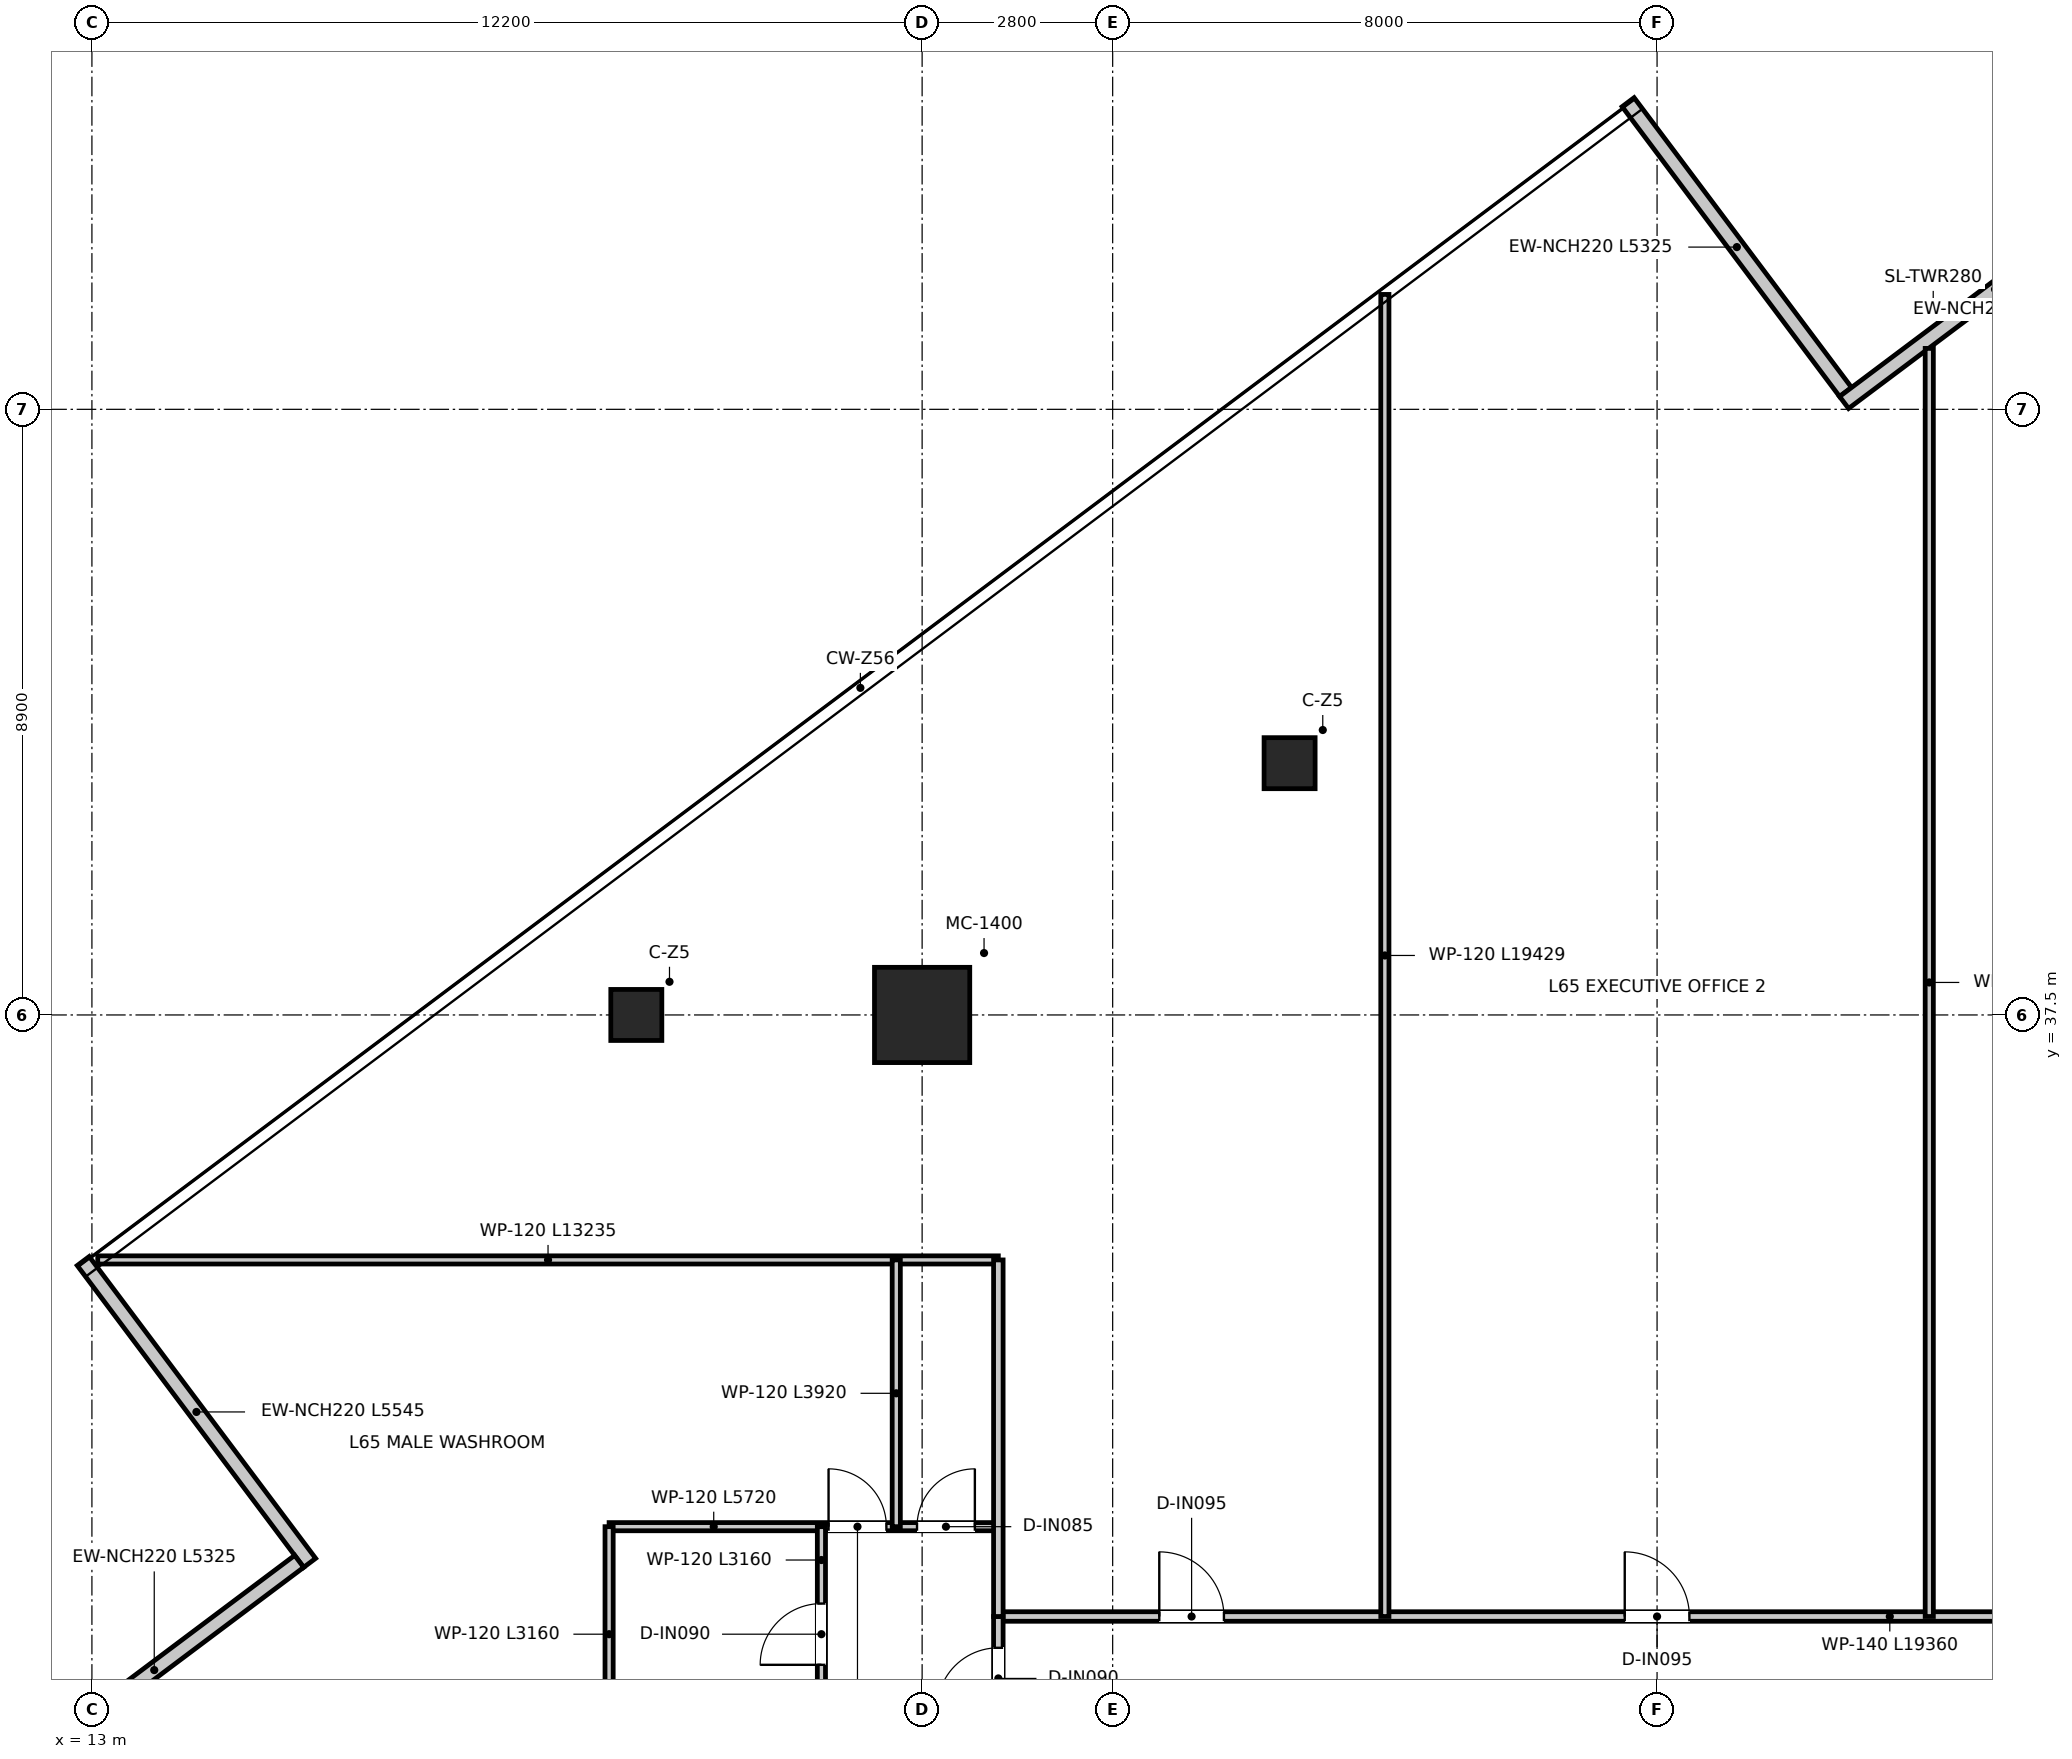
"""IFC4 building model, lengths in metres.
Left out: names, types, materials, properties, quantities, classifications, styles, units other than length and angle.
Written with IfcOpenShell. Run it as: python <this file> out.ifc"""

import sys

from ifc_helpers import new_model, si_unit, direction, frame, frame_2d, origin, origin_2d, place, context, subcontext, project, spatial, rectangle, extrude, source, transform, mapped, element, fill, save


model = new_model("IFC4")
c1 = context("Model", 3, precision=1e-05, world=origin(), true_north=direction((0.0, 1.0)))
c2 = subcontext(c1, "Body", "Model", "MODEL_VIEW")
j1 = project(units=[si_unit("LENGTHUNIT", "METRE"), si_unit("PLANEANGLEUNIT", "RADIAN")], contexts=[c1])
p1 = place(None, origin())
s1 = spatial("IfcSite", under=j1, at=p1, CompositionType="ELEMENT")
p2 = place(p1, origin())
s2 = spatial("IfcBuilding", under=s1, at=p2, CompositionType="ELEMENT")
p3 = place(p2, frame((0.0, 0.0, 267.4)))
s3 = spatial("IfcBuildingStorey", under=s2, at=p3, CompositionType="ELEMENT", Elevation=267.4)
m1 = source(origin(), c2, "Body", "SweptSolid", [
    extrude(rectangle(XDim=1.4, YDim=1.4, at=origin_2d()), origin(), (0.0, 0.0, 1.0), 3.95),
])
p4 = place(p3, frame((25.2, 37.5, 0.0), z_axis=(0.0, 0.0, 1.0), x_axis=(1.0, 0.0, 0.0)))
e1 = element("IfcColumn", 1, at=p4, inside=s3, PredefinedType="USERDEFINED", context=c2, shape_type="MappedRepresentation", body=[
    mapped(m1, transform((0.0, 0.0, 0.0), x_axis=(1.0, 0.0, 0.0), y_axis=(0.0, 1.0, 0.0), z_axis=(0.0, 0.0, 1.0), scale=1.0)),
])
m2 = source(origin(), c2, "Body", "SweptSolid", [
    extrude(rectangle(XDim=0.75, YDim=0.75, at=origin_2d()), origin(), (0.0, 0.0, 1.0), 3.95),
])
for number, where, z_axis, x_axis in (
    (2, (21.0, 37.5, 0.0), (0.0, 0.0, 1.0), (1.0, 0.0, 0.0)),
    (3, (30.6, 41.2, 0.0), (0.0, 0.0, 1.0), (1.0, 0.0, 0.0)),
):
    element("IfcColumn", number, at=place(p3, frame(where, z_axis=z_axis, x_axis=x_axis)), inside=s3, PredefinedType="COLUMN", context=c2, shape_type="MappedRepresentation", body=[
        mapped(m2, transform((0.0, 0.0, 0.0), x_axis=(1.0, 0.0, 0.0), y_axis=(0.0, 1.0, 0.0), z_axis=(0.0, 0.0, 1.0), scale=1.0)),
    ])
p5 = place(p3, frame((38.77, 46.654, 0.0), z_axis=(0.0, 0.0, 1.0), x_axis=(-0.600058683831, 0.799955983763, 0.0)))
e4 = element("IfcWall", 4, at=p5, inside=s3, PredefinedType="ELEMENTEDWALL", context=c2, shape_type="SweptSolid", body=[
    extrude(rectangle(XDim=5.325, YDim=0.22, at=frame_2d((2.663, 0.0))), origin(), (0.0, 0.0, 1.0), 3.67),
])
p6 = place(p3, frame((12.872, 33.884, 0.0), z_axis=(0.0, 0.0, 1.0), x_axis=(0.600063399047, -0.799952446789, 0.0)))
e5 = element("IfcWall", 5, at=p6, inside=s3, PredefinedType="ELEMENTEDWALL", context=c2, shape_type="SweptSolid", body=[
    extrude(rectangle(XDim=5.545, YDim=0.22, at=frame_2d((2.772, 0.0))), origin(), (0.0, 0.0, 1.0), 3.67),
])
p7 = place(p3, frame((16.046, 29.47, 0.0), z_axis=(0.0, 0.0, 1.0), x_axis=(-0.799939474344, -0.600080692395, 0.0)))
e6 = element("IfcWall", 6, at=p7, inside=s3, PredefinedType="ELEMENTEDWALL", context=c2, shape_type="SweptSolid", body=[
    extrude(rectangle(XDim=5.325, YDim=0.22, at=frame_2d((2.662, 0.0))), origin(), (0.0, 0.0, 1.0), 3.67),
])
p8 = place(p3, frame((43.184, 49.828, 0.0), z_axis=(0.0, 0.0, 1.0), x_axis=(-0.799936592369, -0.600084534203, 0.0)))
e7 = element("IfcWall", 7, at=p8, inside=s3, PredefinedType="ELEMENTEDWALL", context=c2, shape_type="SweptSolid", body=[
    extrude(rectangle(XDim=5.545, YDim=0.22, at=frame_2d((2.772, 0.0))), origin(), (0.0, 0.0, 1.0), 3.67),
])
p9 = place(p3, frame((26.32, 28.66, 0.0), z_axis=(0.0, 0.0, 1.0), x_axis=(1.0, 0.0, 0.0)))
e8 = element("IfcWall", 8, at=p9, inside=s3, PredefinedType="PARTITIONING", context=c2, shape_type="SweptSolid", body=[
    extrude(rectangle(XDim=19.36, YDim=0.14, at=frame_2d((9.68, 0.0))), origin(), (0.0, 0.0, 1.0), 3.18),
])
p10 = place(p9, frame((2.365, 0.0, 0.0)))
e9 = element("IfcOpeningElement", 9, at=p10, cuts=e8, PredefinedType="OPENING", context=c2, shape_type="SweptSolid", body=[
    extrude(rectangle(XDim=0.95, YDim=2.1, at=frame_2d((0.475, 1.05))), frame((0.0, 0.08, 0.0), z_axis=(0.0, -1.0, 0.0), x_axis=(1.0, 0.0, 0.0)), (0.0, 0.0, 1.0), 0.16),
])
p11 = place(p9, frame((9.205, 0.0, 0.0)))
e10 = element("IfcOpeningElement", 10, at=p11, cuts=e8, PredefinedType="OPENING", context=c2, shape_type="SweptSolid", body=[
    extrude(rectangle(XDim=0.95, YDim=2.1, at=frame_2d((0.475, 1.05))), frame((0.0, 0.08, 0.0), z_axis=(0.0, -1.0, 0.0), x_axis=(1.0, 0.0, 0.0)), (0.0, 0.0, 1.0), 0.16),
])
p12 = place(p9, frame((16.045, 0.0, 0.0)))
e11 = element("IfcOpeningElement", 11, at=p12, cuts=e8, PredefinedType="OPENING", context=c2, shape_type="SweptSolid", body=[
    extrude(rectangle(XDim=0.95, YDim=2.1, at=frame_2d((0.475, 1.05))), frame((0.0, 0.08, 0.0), z_axis=(0.0, -1.0, 0.0), x_axis=(1.0, 0.0, 0.0)), (0.0, 0.0, 1.0), 0.16),
])
p13 = place(p3, frame((26.32, 9.0, 0.0), z_axis=(0.0, 0.0, 1.0), x_axis=(0.0, 1.0, 0.0)))
e12 = element("IfcWall", 12, at=p13, inside=s3, PredefinedType="PARTITIONING", context=c2, shape_type="SweptSolid", body=[
    extrude(rectangle(XDim=19.66, YDim=0.14, at=frame_2d((9.83, 0.0))), origin(), (0.0, 0.0, 1.0), 3.13),
])
p14 = place(p13, frame((18.3, 0.0, 0.0)))
e13 = element("IfcOpeningElement", 13, at=p14, cuts=e12, PredefinedType="OPENING", context=c2, shape_type="SweptSolid", body=[
    extrude(rectangle(XDim=0.9, YDim=2.1, at=frame_2d((0.45, 1.05))), frame((0.0, 0.08, 0.0), z_axis=(0.0, -1.0, 0.0), x_axis=(1.0, 0.0, 0.0)), (0.0, 0.0, 1.0), 0.16),
])
p15 = place(p13, frame((1.8, 0.0, 0.0)))
e14 = element("IfcOpeningElement", 14, at=p15, cuts=e12, PredefinedType="OPENING", context=c2, shape_type="SweptSolid", body=[
    extrude(rectangle(XDim=0.9, YDim=2.1, at=frame_2d((0.45, 1.05))), frame((0.0, 0.08, 0.0), z_axis=(0.0, -1.0, 0.0), x_axis=(1.0, 0.0, 0.0)), (0.0, 0.0, 1.0), 0.16),
])
p16 = place(p13, frame((9.55, 0.0, 0.0)))
e15 = element("IfcOpeningElement", 15, at=p16, cuts=e12, PredefinedType="OPENING", context=c2, shape_type="SweptSolid", body=[
    extrude(rectangle(XDim=0.9, YDim=2.1, at=frame_2d((0.45, 1.05))), frame((0.0, 0.08, 0.0), z_axis=(0.0, -1.0, 0.0), x_axis=(1.0, 0.0, 0.0)), (0.0, 0.0, 1.0), 0.16),
])
p17 = place(p13, frame((14.21, 0.0, 0.0)))
e16 = element("IfcOpeningElement", 16, at=p17, cuts=e12, PredefinedType="OPENING", context=c2, shape_type="SweptSolid", body=[
    extrude(rectangle(XDim=0.9, YDim=2.1, at=frame_2d((0.45, 1.05))), frame((0.0, 0.08, 0.0), z_axis=(0.0, -1.0, 0.0), x_axis=(1.0, 0.0, 0.0)), (0.0, 0.0, 1.0), 0.16),
])
p18 = place(p3, frame((13.085, 33.9, 0.0), z_axis=(0.0, 0.0, 1.0), x_axis=(1.0, 0.0, 0.0)))
e17 = element("IfcWall", 17, at=p18, inside=s3, PredefinedType="PARTITIONING", context=c2, shape_type="SweptSolid", body=[
    extrude(rectangle(XDim=13.235, YDim=0.12, at=frame_2d((6.617, 0.0))), origin(), (0.0, 0.0, 1.0), 3.13),
])
p19 = place(p3, frame((20.6, 29.98, 0.0), z_axis=(0.0, 0.0, 1.0), x_axis=(1.0, 0.0, 0.0)))
e18 = element("IfcWall", 18, at=p19, inside=s3, PredefinedType="PARTITIONING", context=c2, shape_type="SweptSolid", body=[
    extrude(rectangle(XDim=5.72, YDim=0.12, at=frame_2d((2.86, 0.0))), origin(), (0.0, 0.0, 1.0), 3.13),
])
p20 = place(p19, frame((3.225, 0.0, 0.0)))
e19 = element("IfcOpeningElement", 19, at=p20, cuts=e18, PredefinedType="OPENING", context=c2, shape_type="SweptSolid", body=[
    extrude(rectangle(XDim=0.85, YDim=2.1, at=frame_2d((0.425, 1.05))), frame((0.0, 0.07, 0.0), z_axis=(0.0, -1.0, 0.0), x_axis=(1.0, 0.0, 0.0)), (0.0, 0.0, 1.0), 0.14),
])
p21 = place(p19, frame((4.525, 0.0, 0.0)))
e20 = element("IfcOpeningElement", 20, at=p21, cuts=e18, PredefinedType="OPENING", context=c2, shape_type="SweptSolid", body=[
    extrude(rectangle(XDim=0.85, YDim=2.1, at=frame_2d((0.425, 1.05))), frame((0.0, 0.07, 0.0), z_axis=(0.0, -1.0, 0.0), x_axis=(1.0, 0.0, 0.0)), (0.0, 0.0, 1.0), 0.14),
])
p22 = place(p3, frame((20.6, 26.82, 0.0), z_axis=(0.0, 0.0, 1.0), x_axis=(0.0, 1.0, 0.0)))
e21 = element("IfcWall", 21, at=p22, inside=s3, PredefinedType="PARTITIONING", context=c2, shape_type="SweptSolid", body=[
    extrude(rectangle(XDim=3.16, YDim=0.12, at=frame_2d((1.58, 0.0))), origin(), (0.0, 0.0, 1.0), 3.67),
])
p23 = place(p3, frame((23.72, 26.82, 0.0), z_axis=(0.0, 0.0, 1.0), x_axis=(0.0, 1.0, 0.0)))
e22 = element("IfcWall", 22, at=p23, inside=s3, PredefinedType="PARTITIONING", context=c2, shape_type="SweptSolid", body=[
    extrude(rectangle(XDim=3.16, YDim=0.12, at=frame_2d((1.58, 0.0))), origin(), (0.0, 0.0, 1.0), 3.18),
])
p24 = place(p23, frame((1.13, 0.0, 0.0)))
e23 = element("IfcOpeningElement", 23, at=p24, cuts=e22, PredefinedType="OPENING", context=c2, shape_type="SweptSolid", body=[
    extrude(rectangle(XDim=0.9, YDim=2.1, at=frame_2d((0.45, 1.05))), frame((0.0, 0.07, 0.0), z_axis=(0.0, -1.0, 0.0), x_axis=(1.0, 0.0, 0.0)), (0.0, 0.0, 1.0), 0.14),
])
p25 = place(p3, frame((24.82, 29.98, 0.0), z_axis=(0.0, 0.0, 1.0), x_axis=(0.0, 1.0, 0.0)))
e24 = element("IfcWall", 24, at=p25, inside=s3, PredefinedType="PARTITIONING", context=c2, shape_type="SweptSolid", body=[
    extrude(rectangle(XDim=3.92, YDim=0.12, at=frame_2d((1.96, 0.0))), origin(), (0.0, 0.0, 1.0), 3.31),
])
p26 = place(p3, frame((26.32, 28.66, 0.0), z_axis=(0.0, 0.0, 1.0), x_axis=(0.0, 1.0, 0.0)))
e25 = element("IfcWall", 25, at=p26, inside=s3, PredefinedType="PARTITIONING", context=c2, shape_type="SweptSolid", body=[
    extrude(rectangle(XDim=5.24, YDim=0.14, at=frame_2d((2.62, 0.0))), origin(), (0.0, 0.0, 1.0), 3.43),
])
p27 = place(p3, frame((32.0, 28.66, 0.0), z_axis=(0.0, 0.0, 1.0), x_axis=(0.0, 1.0, 0.0)))
e26 = element("IfcWall", 26, at=p27, inside=s3, PredefinedType="PARTITIONING", context=c2, shape_type="SweptSolid", body=[
    extrude(rectangle(XDim=19.429, YDim=0.12, at=frame_2d((9.714, 0.0))), origin(), (0.0, 0.0, 1.0), 3.13),
])
p28 = place(p3, frame((40.0, 28.66, 0.0), z_axis=(0.0, 0.0, 1.0), x_axis=(0.0, 1.0, 0.0)))
e27 = element("IfcWall", 27, at=p28, inside=s3, PredefinedType="PARTITIONING", context=c2, shape_type="SweptSolid", body=[
    extrude(rectangle(XDim=18.635, YDim=0.12, at=frame_2d((9.318, 0.0))), origin(), (0.0, 0.0, 1.0), 3.13),
])
p29 = place(p14, origin())
e28 = element("IfcDoor", 28, at=p29, inside=s3, OperationType="SINGLE_SWING_LEFT", PredefinedType="DOOR", context=c2, shape_type="SweptSolid", body=[
    extrude(rectangle(XDim=0.9, YDim=2.1, at=frame_2d((0.45, 1.05))), frame((0.0, 0.025, 0.0), z_axis=(0.0, -1.0, 0.0), x_axis=(1.0, 0.0, 0.0)), (0.0, 0.0, 1.0), 0.05),
])
fill(e13, e28)
p30 = place(p20, origin())
e29 = element("IfcDoor", 29, at=p30, inside=s3, OperationType="SINGLE_SWING_LEFT", PredefinedType="DOOR", context=c2, shape_type="SweptSolid", body=[
    extrude(rectangle(XDim=0.85, YDim=2.1, at=frame_2d((0.425, 1.05))), frame((0.0, 0.025, 0.0), z_axis=(0.0, -1.0, 0.0), x_axis=(1.0, 0.0, 0.0)), (0.0, 0.0, 1.0), 0.05),
])
fill(e19, e29)
p31 = place(p21, origin())
e30 = element("IfcDoor", 30, at=p31, inside=s3, OperationType="SINGLE_SWING_RIGHT", PredefinedType="DOOR", context=c2, shape_type="SweptSolid", body=[
    extrude(rectangle(XDim=0.85, YDim=2.1, at=frame_2d((0.425, 1.05))), frame((0.0, 0.025, 0.0), z_axis=(0.0, -1.0, 0.0), x_axis=(1.0, 0.0, 0.0)), (0.0, 0.0, 1.0), 0.05),
])
fill(e20, e30)
p32 = place(p24, origin())
e31 = element("IfcDoor", 31, at=p32, inside=s3, OperationType="SINGLE_SWING_LEFT", PredefinedType="DOOR", context=c2, shape_type="SweptSolid", body=[
    extrude(rectangle(XDim=0.9, YDim=2.1, at=frame_2d((0.45, 1.05))), frame((0.0, 0.025, 0.0), z_axis=(0.0, -1.0, 0.0), x_axis=(1.0, 0.0, 0.0)), (0.0, 0.0, 1.0), 0.05),
])
fill(e23, e31)
p33 = place(p10, origin())
e32 = element("IfcDoor", 32, at=p33, inside=s3, OperationType="SINGLE_SWING_LEFT", PredefinedType="DOOR", context=c2, shape_type="SweptSolid", body=[
    extrude(rectangle(XDim=0.95, YDim=2.1, at=frame_2d((0.475, 1.05))), frame((0.0, 0.025, 0.0), z_axis=(0.0, -1.0, 0.0), x_axis=(1.0, 0.0, 0.0)), (0.0, 0.0, 1.0), 0.05),
])
fill(e9, e32)
p34 = place(p11, origin())
e33 = element("IfcDoor", 33, at=p34, inside=s3, OperationType="SINGLE_SWING_LEFT", PredefinedType="DOOR", context=c2, shape_type="SweptSolid", body=[
    extrude(rectangle(XDim=0.95, YDim=2.1, at=frame_2d((0.475, 1.05))), frame((0.0, 0.025, 0.0), z_axis=(0.0, -1.0, 0.0), x_axis=(1.0, 0.0, 0.0)), (0.0, 0.0, 1.0), 0.05),
])
fill(e10, e33)
save(model, sys.argv[1])
